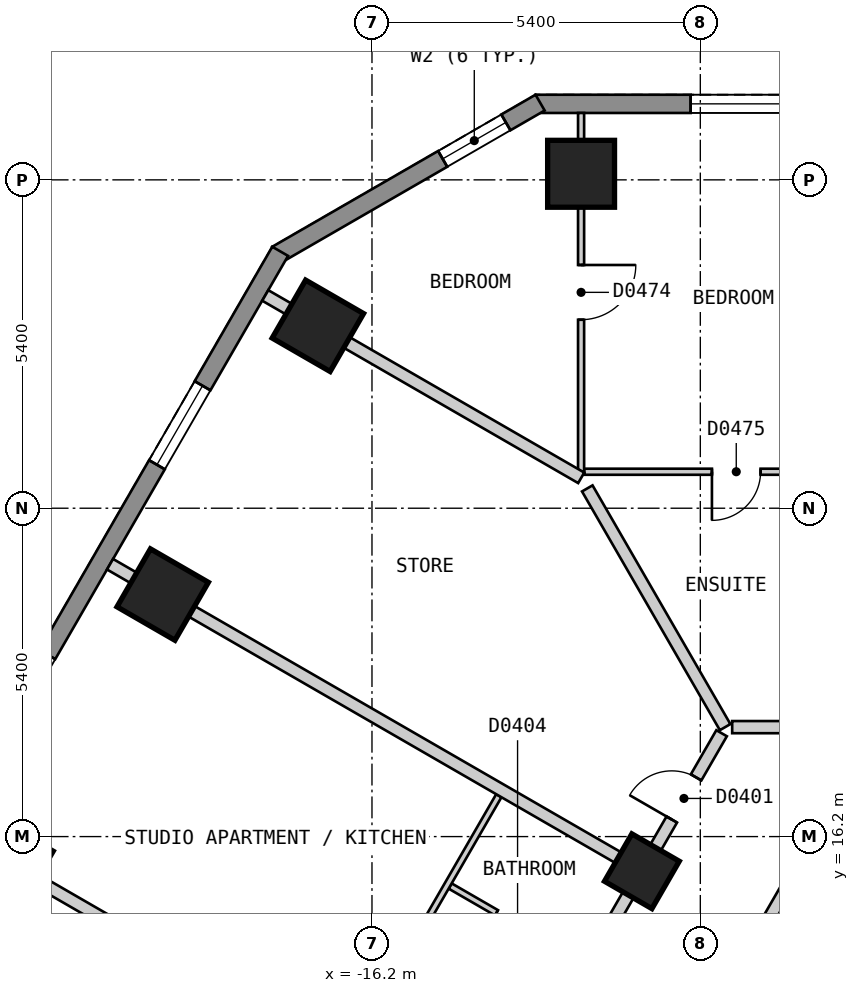
"""IFC4 building model, lengths in metres.
Left out: names, types, materials, properties, quantities, classifications, styles, units other than length and angle.
Written with IfcOpenShell. Run it as: python <this file> out.ifc"""

import sys

from ifc_helpers import new_model, si_unit, direction, frame, frame_2d, origin, origin_2d, place, context, subcontext, project, spatial, polyline, rectangle, outline, extrude, element, fill, save


model = new_model("IFC4")
c1 = context("Model", 3, precision=1e-05, world=origin(), true_north=direction((0.0, 1.0)))
c2 = subcontext(c1, "Body", "Model", "MODEL_VIEW")
j1 = project(units=[si_unit("LENGTHUNIT", "METRE"), si_unit("PLANEANGLEUNIT", "RADIAN")], contexts=[c1])
p1 = place(None, origin())
s1 = spatial("IfcSite", under=j1, at=p1, CompositionType="ELEMENT")
p2 = place(p1, origin())
s2 = spatial("IfcBuilding", under=s1, at=p2, CompositionType="ELEMENT")
p3 = place(p2, frame((0.0, 0.0, 32.4)))
s3 = spatial("IfcBuildingStorey", under=s2, at=p3, CompositionType="ELEMENT", Elevation=32.4)
for number, where, z_axis, x_axis in (
    (1, (-12.761, 27.1, 0.0), (0.0, 0.0, 1.0), (-1.0, 0.0, 0.0)),
    (2, (-17.09, 24.6, 0.0), (0.0, 0.0, 1.0), (-0.5, -0.866, 0.0)),
    (3, (-19.642, 20.18, 0.0), (0.0, 0.0, 1.0), (-0.5, -0.866, 0.0)),
    (4, (-22.194, 15.759, 0.0), (0.0, 0.0, 1.0), (-0.5, -0.866, 0.0)),
):
    element("IfcColumn", number, at=place(p3, frame(where, z_axis=z_axis, x_axis=x_axis)), inside=s3, PredefinedType="COLUMN", context=c2, shape_type="SweptSolid", body=[
        extrude(rectangle(XDim=1.1, YDim=1.1, at=origin_2d()), origin(), (0.0, 0.0, 1.0), 3.0),
    ])
p4 = place(p3, frame((-11.761, 15.63, 0.0), z_axis=(0.0, 0.0, 1.0), x_axis=(-0.499984884929, -0.866034130299, 0.0)))
e5 = element("IfcColumn", 5, at=p4, inside=s3, PredefinedType="COLUMN", context=c2, shape_type="SweptSolid", body=[
    extrude(rectangle(XDim=0.9, YDim=0.9, at=origin_2d()), origin(), (0.0, 0.0, 1.0), 3.0),
])
p5 = place(p3, frame((13.51, 28.25, 0.0), z_axis=(0.0, 0.0, 1.0), x_axis=(-1.0, 0.0, 0.0)))
e6 = element("IfcWall", 6, at=p5, inside=s3, PredefinedType="SOLIDWALL", context=c2, shape_type="SweptSolid", body=[
    extrude(outline(polyline([(0.0, -0.15), (27.02, -0.15), (26.94, 0.15), (0.08, 0.15), (0.0, -0.15)])), origin(), (0.0, 0.0, 1.0), 2.7),
])
p6 = place(p5, frame((2.553, 0.0, 0.15)))
e7 = element("IfcOpeningElement", 7, at=p6, cuts=e6, PredefinedType="OPENING", context=c2, shape_type="SweptSolid", body=[
    extrude(rectangle(XDim=1.5, YDim=2.1, at=frame_2d((0.75, 1.05))), frame((0.0, 0.16, 0.0), z_axis=(0.0, -1.0, 0.0), x_axis=(1.0, 0.0, 0.0)), (0.0, 0.0, 1.0), 0.32),
])
p7 = place(p5, frame((7.657, 0.0, 0.15)))
e8 = element("IfcOpeningElement", 8, at=p7, cuts=e6, PredefinedType="OPENING", context=c2, shape_type="SweptSolid", body=[
    extrude(rectangle(XDim=1.5, YDim=2.1, at=frame_2d((0.75, 1.05))), frame((0.0, 0.16, 0.0), z_axis=(0.0, -1.0, 0.0), x_axis=(1.0, 0.0, 0.0)), (0.0, 0.0, 1.0), 0.32),
])
p8 = place(p5, frame((12.761, 0.0, 0.15)))
e9 = element("IfcOpeningElement", 9, at=p8, cuts=e6, PredefinedType="OPENING", context=c2, shape_type="SweptSolid", body=[
    extrude(rectangle(XDim=1.5, YDim=2.1, at=frame_2d((0.75, 1.05))), frame((0.0, 0.16, 0.0), z_axis=(0.0, -1.0, 0.0), x_axis=(1.0, 0.0, 0.0)), (0.0, 0.0, 1.0), 0.32),
])
p9 = place(p5, frame((17.865, 0.0, 0.15)))
e10 = element("IfcOpeningElement", 10, at=p9, cuts=e6, PredefinedType="OPENING", context=c2, shape_type="SweptSolid", body=[
    extrude(rectangle(XDim=1.5, YDim=2.1, at=frame_2d((0.75, 1.05))), frame((0.0, 0.16, 0.0), z_axis=(0.0, -1.0, 0.0), x_axis=(1.0, 0.0, 0.0)), (0.0, 0.0, 1.0), 0.32),
])
p10 = place(p5, frame((22.969, 0.0, 0.15)))
e11 = element("IfcOpeningElement", 11, at=p10, cuts=e6, PredefinedType="OPENING", context=c2, shape_type="SweptSolid", body=[
    extrude(rectangle(XDim=1.5, YDim=2.1, at=frame_2d((0.75, 1.05))), frame((0.0, 0.16, 0.0), z_axis=(0.0, -1.0, 0.0), x_axis=(1.0, 0.0, 0.0)), (0.0, 0.0, 1.0), 0.32),
])
p11 = place(p3, frame((-13.435, 28.27, 0.0), z_axis=(0.0, 0.0, 1.0), x_axis=(-0.866010750942, -0.50002537861, 0.0)))
e12 = element("IfcWall", 12, at=p11, inside=s3, PredefinedType="SOLIDWALL", context=c2, shape_type="SweptSolid", body=[
    extrude(outline(polyline([(0.0, -0.15), (5.0, -0.15), (4.919, 0.15), (0.08, 0.15), (0.0, -0.15)])), origin(), (0.0, 0.0, 1.0), 2.7),
])
p12 = place(p11, frame((0.65, 0.0, 0.15)))
e13 = element("IfcOpeningElement", 13, at=p12, cuts=e12, PredefinedType="OPENING", context=c2, shape_type="SweptSolid", body=[
    extrude(rectangle(XDim=1.2, YDim=2.1, at=frame_2d((0.6, 1.05))), frame((0.0, 0.16, 0.0), z_axis=(0.0, -1.0, 0.0), x_axis=(1.0, 0.0, 0.0)), (0.0, 0.0, 1.0), 0.32),
])
p13 = place(p3, frame((-17.71, 25.825, 0.0), z_axis=(0.0, 0.0, 1.0), x_axis=(-0.500001938803, -0.866024284413, 0.0)))
e14 = element("IfcWall", 14, at=p13, inside=s3, PredefinedType="SOLIDWALL", context=c2, shape_type="SweptSolid", body=[
    extrude(outline(polyline([(0.0, -0.15), (27.02, -0.15), (26.94, 0.15), (0.08, 0.15), (0.0, -0.15)])), origin(), (0.0, 0.0, 1.0), 2.7),
])
p14 = place(p13, frame((2.553, 0.0, 0.15)))
e15 = element("IfcOpeningElement", 15, at=p14, cuts=e14, PredefinedType="OPENING", context=c2, shape_type="SweptSolid", body=[
    extrude(rectangle(XDim=1.5, YDim=2.1, at=frame_2d((0.75, 1.05))), frame((0.0, 0.16, 0.0), z_axis=(0.0, -1.0, 0.0), x_axis=(1.0, 0.0, 0.0)), (0.0, 0.0, 1.0), 0.32),
])
p15 = place(p13, frame((7.658, 0.0, 0.15)))
e16 = element("IfcOpeningElement", 16, at=p15, cuts=e14, PredefinedType="OPENING", context=c2, shape_type="SweptSolid", body=[
    extrude(rectangle(XDim=1.5, YDim=2.1, at=frame_2d((0.75, 1.05))), frame((0.0, 0.16, 0.0), z_axis=(0.0, -1.0, 0.0), x_axis=(1.0, 0.0, 0.0)), (0.0, 0.0, 1.0), 0.32),
])
p16 = place(p13, frame((12.761, 0.0, 0.15)))
e17 = element("IfcOpeningElement", 17, at=p16, cuts=e14, PredefinedType="OPENING", context=c2, shape_type="SweptSolid", body=[
    extrude(rectangle(XDim=1.5, YDim=2.1, at=frame_2d((0.75, 1.05))), frame((0.0, 0.16, 0.0), z_axis=(0.0, -1.0, 0.0), x_axis=(1.0, 0.0, 0.0)), (0.0, 0.0, 1.0), 0.32),
])
p17 = place(p13, frame((17.865, 0.0, 0.15)))
e18 = element("IfcOpeningElement", 18, at=p17, cuts=e14, PredefinedType="OPENING", context=c2, shape_type="SweptSolid", body=[
    extrude(rectangle(XDim=1.5, YDim=2.1, at=frame_2d((0.75, 1.05))), frame((0.0, 0.16, 0.0), z_axis=(0.0, -1.0, 0.0), x_axis=(1.0, 0.0, 0.0)), (0.0, 0.0, 1.0), 0.32),
])
p18 = place(p13, frame((22.969, 0.0, 0.15)))
e19 = element("IfcOpeningElement", 19, at=p18, cuts=e14, PredefinedType="OPENING", context=c2, shape_type="SweptSolid", body=[
    extrude(rectangle(XDim=1.5, YDim=2.1, at=frame_2d((0.75, 1.05))), frame((0.0, 0.16, 0.0), z_axis=(0.0, -1.0, 0.0), x_axis=(1.0, 0.0, 0.0)), (0.0, 0.0, 1.0), 0.32),
])
p19 = place(p3, frame((-10.276, 18.0, 0.0), z_axis=(0.0, 0.0, 1.0), x_axis=(1.0, 0.0, 0.0)))
e20 = element("IfcWall", 20, at=p19, inside=s3, PredefinedType="PARTITIONING", context=c2, shape_type="SweptSolid", body=[
    extrude(rectangle(XDim=20.5, YDim=0.2, at=frame_2d((10.25, 0.0))), origin(), (0.0, 0.0, 1.0), 2.7),
])
p20 = place(p19, frame((19.265, 0.0, 0.0)))
e21 = element("IfcOpeningElement", 21, at=p20, cuts=e20, PredefinedType="OPENING", context=c2, shape_type="SweptSolid", body=[
    extrude(rectangle(XDim=1.0, YDim=2.1, at=frame_2d((0.5, 1.05))), frame((0.0, 0.11, 0.0), z_axis=(0.0, -1.0, 0.0), x_axis=(1.0, 0.0, 0.0)), (0.0, 0.0, 1.0), 0.22),
])
p21 = place(p19, frame((9.775, 0.0, 0.0)))
e22 = element("IfcOpeningElement", 22, at=p21, cuts=e20, PredefinedType="OPENING", context=c2, shape_type="SweptSolid", body=[
    extrude(rectangle(XDim=1.0, YDim=2.1, at=frame_2d((0.5, 1.05))), frame((0.0, 0.11, 0.0), z_axis=(0.0, -1.0, 0.0), x_axis=(1.0, 0.0, 0.0)), (0.0, 0.0, 1.0), 0.22),
])
p22 = place(p19, frame((4.671, 0.0, 0.0)))
e23 = element("IfcOpeningElement", 23, at=p22, cuts=e20, PredefinedType="OPENING", context=c2, shape_type="SweptSolid", body=[
    extrude(rectangle(XDim=1.0, YDim=2.1, at=frame_2d((0.5, 1.05))), frame((0.0, 0.11, 0.0), z_axis=(0.0, -1.0, 0.0), x_axis=(1.0, 0.0, 0.0)), (0.0, 0.0, 1.0), 0.22),
])
p23 = place(p3, frame((-10.854, 8.0, 0.0), z_axis=(0.0, 0.0, 1.0), x_axis=(0.499964141897, 0.86604610548, 0.0)))
e24 = element("IfcWall", 24, at=p23, inside=s3, PredefinedType="PARTITIONING", context=c2, shape_type="SweptSolid", body=[
    extrude(rectangle(XDim=9.007, YDim=0.2, at=frame_2d((4.503, 0.0))), origin(), (0.0, 0.0, 1.0), 2.7),
])
p24 = place(p3, frame((-18.244, -0.001, 0.0), z_axis=(0.0, 0.0, 1.0), x_axis=(0.499962999376, 0.866046765051, 0.0)))
e25 = element("IfcWall", 25, at=p24, inside=s3, PredefinedType="PARTITIONING", context=c2, shape_type="SweptSolid", body=[
    extrude(rectangle(XDim=18.245, YDim=0.2, at=frame_2d((9.123, 0.0))), origin(), (0.0, 0.0, 1.0), 2.7),
])
p25 = place(p24, frame((8.672, 0.0, 0.0)))
e26 = element("IfcOpeningElement", 26, at=p25, cuts=e25, PredefinedType="OPENING", context=c2, shape_type="SweptSolid", body=[
    extrude(rectangle(XDim=0.9, YDim=2.1, at=frame_2d((0.45, 1.05))), frame((0.0, 0.11, 0.0), z_axis=(0.0, -1.0, 0.0), x_axis=(1.0, 0.0, 0.0)), (0.0, 0.0, 1.0), 0.22),
])
p26 = place(p3, frame((-20.727, 0.099, 0.0), z_axis=(0.0, 0.0, 1.0), x_axis=(0.499993204491, 0.866029327138, 0.0)))
e27 = element("IfcWall", 27, at=p26, inside=s3, PredefinedType="PARTITIONING", context=c2, shape_type="SweptSolid", body=[
    extrude(rectangle(XDim=20.554, YDim=0.2, at=frame_2d((10.277, 0.0))), origin(), (0.0, 0.0, 1.0), 2.7),
])
p27 = place(p26, frame((18.916, 0.0, 0.0)))
e28 = element("IfcOpeningElement", 28, at=p27, cuts=e27, PredefinedType="OPENING", context=c2, shape_type="SweptSolid", body=[
    extrude(rectangle(XDim=0.8, YDim=2.1, at=frame_2d((0.4, 1.05))), frame((0.0, 0.11, 0.0), z_axis=(0.0, -1.0, 0.0), x_axis=(1.0, 0.0, 0.0)), (0.0, 0.0, 1.0), 0.22),
])
p28 = place(p26, frame((14.88, 0.0, 0.0)))
e29 = element("IfcOpeningElement", 29, at=p28, cuts=e27, PredefinedType="OPENING", context=c2, shape_type="SweptSolid", body=[
    extrude(rectangle(XDim=1.0, YDim=2.1, at=frame_2d((0.5, 1.05))), frame((0.0, 0.11, 0.0), z_axis=(0.0, -1.0, 0.0), x_axis=(1.0, 0.0, 0.0)), (0.0, 0.0, 1.0), 0.22),
])
p29 = place(p26, frame((9.776, 0.0, 0.0)))
e30 = element("IfcOpeningElement", 30, at=p29, cuts=e27, PredefinedType="OPENING", context=c2, shape_type="SweptSolid", body=[
    extrude(rectangle(XDim=1.0, YDim=2.1, at=frame_2d((0.5, 1.05))), frame((0.0, 0.11, 0.0), z_axis=(0.0, -1.0, 0.0), x_axis=(1.0, 0.0, 0.0)), (0.0, 0.0, 1.0), 0.22),
])
p30 = place(p26, frame((4.673, 0.0, 0.0)))
e31 = element("IfcOpeningElement", 31, at=p30, cuts=e27, PredefinedType="OPENING", context=c2, shape_type="SweptSolid", body=[
    extrude(rectangle(XDim=1.0, YDim=2.1, at=frame_2d((0.5, 1.05))), frame((0.0, 0.11, 0.0), z_axis=(0.0, -1.0, 0.0), x_axis=(1.0, 0.0, 0.0)), (0.0, 0.0, 1.0), 0.22),
])
p31 = place(p26, frame((0.838, 0.0, 0.0)))
e32 = element("IfcOpeningElement", 32, at=p31, cuts=e27, PredefinedType="OPENING", context=c2, shape_type="SweptSolid", body=[
    extrude(rectangle(XDim=0.8, YDim=2.1, at=frame_2d((0.4, 1.05))), frame((0.0, 0.11, 0.0), z_axis=(0.0, -1.0, 0.0), x_axis=(1.0, 0.0, 0.0)), (0.0, 0.0, 1.0), 0.22),
])
p32 = place(p3, frame((-14.914, 15.387, 0.0), z_axis=(0.0, 0.0, 1.0), x_axis=(0.865983051302, -0.500073349477, 0.0)))
e33 = element("IfcWall", 33, at=p32, inside=s3, PredefinedType="PARTITIONING", context=c2, shape_type="SweptSolid", body=[
    extrude(rectangle(XDim=2.509, YDim=0.1, at=frame_2d((1.255, 0.0))), origin(), (0.0, 0.0, 1.0), 2.7),
])
p33 = place(p32, frame((0.88, 0.0, 0.0)))
e34 = element("IfcOpeningElement", 34, at=p33, cuts=e33, PredefinedType="OPENING", context=c2, shape_type="SweptSolid", body=[
    extrude(rectangle(XDim=0.8, YDim=2.1, at=frame_2d((0.4, 1.05))), frame((0.0, 0.06, 0.0), z_axis=(0.0, -1.0, 0.0), x_axis=(1.0, 0.0, 0.0)), (0.0, 0.0, 1.0), 0.12),
])
p34 = place(p3, frame((-12.711, 22.2, 0.0), z_axis=(0.0, 0.0, 1.0), x_axis=(1.0, 0.0, 0.0)))
e35 = element("IfcWall", 35, at=p34, inside=s3, PredefinedType="PARTITIONING", context=c2, shape_type="SweptSolid", body=[
    extrude(rectangle(XDim=10.058, YDim=0.1, at=frame_2d((5.029, 0.0))), origin(), (0.0, 0.0, 1.0), 2.7),
])
p35 = place(p34, frame((7.156, 0.0, 0.0)))
e36 = element("IfcOpeningElement", 36, at=p35, cuts=e35, PredefinedType="OPENING", context=c2, shape_type="SweptSolid", body=[
    extrude(rectangle(XDim=0.9, YDim=2.1, at=frame_2d((0.45, 1.05))), frame((0.0, 0.06, 0.0), z_axis=(0.0, -1.0, 0.0), x_axis=(1.0, 0.0, 0.0)), (0.0, 0.0, 1.0), 0.12),
])
p36 = place(p34, frame((2.102, 0.0, 0.0)))
e37 = element("IfcOpeningElement", 37, at=p36, cuts=e35, PredefinedType="OPENING", context=c2, shape_type="SweptSolid", body=[
    extrude(rectangle(XDim=0.8, YDim=2.1, at=frame_2d((0.4, 1.05))), frame((0.0, 0.06, 0.0), z_axis=(0.0, -1.0, 0.0), x_axis=(1.0, 0.0, 0.0)), (0.0, 0.0, 1.0), 0.12),
])
p37 = place(p3, frame((-15.723, 14.087, 0.0), z_axis=(0.0, 0.0, 1.0), x_axis=(0.500204249835, 0.865907447969, 0.0)))
e38 = element("IfcWall", 38, at=p37, inside=s3, PredefinedType="PARTITIONING", context=c2, shape_type="SweptSolid", body=[
    extrude(rectangle(XDim=3.217, YDim=0.1, at=frame_2d((1.608, 0.0))), origin(), (0.0, 0.0, 1.0), 2.7),
])
p38 = place(p3, frame((-12.761, 22.2, 0.0), z_axis=(0.0, 0.0, 1.0), x_axis=(0.0, 1.0, 0.0)))
e39 = element("IfcWall", 39, at=p38, inside=s3, PredefinedType="PARTITIONING", context=c2, shape_type="SweptSolid", body=[
    extrude(rectangle(XDim=5.9, YDim=0.1, at=frame_2d((2.95, 0.0))), origin(), (0.0, 0.0, 1.0), 2.7),
])
p39 = place(p38, frame((2.5, 0.0, 0.0)))
e40 = element("IfcOpeningElement", 40, at=p39, cuts=e39, PredefinedType="OPENING", context=c2, shape_type="SweptSolid", body=[
    extrude(rectangle(XDim=0.9, YDim=2.1, at=frame_2d((0.45, 1.05))), frame((0.0, 0.06, 0.0), z_axis=(0.0, -1.0, 0.0), x_axis=(1.0, 0.0, 0.0)), (0.0, 0.0, 1.0), 0.12),
])
p40 = place(p3, frame((-12.659, 21.926, 0.0), z_axis=(0.0, 0.0, 1.0), x_axis=(0.500025458316, -0.86601070492, 0.0)))
e41 = element("IfcWall", 41, at=p40, inside=s3, PredefinedType="PARTITIONING", context=c2, shape_type="SweptSolid", body=[
    extrude(rectangle(XDim=4.533, YDim=0.2, at=frame_2d((2.267, 0.0))), origin(), (0.0, 0.0, 1.0), 2.7),
])
p41 = place(p3, frame((-20.508, 20.679, 0.0), z_axis=(0.0, 0.0, 1.0), x_axis=(0.866047370643, -0.499961950354, 0.0)))
e42 = element("IfcWall", 42, at=p41, inside=s3, PredefinedType="PARTITIONING", context=c2, shape_type="SweptSolid", body=[
    extrude(rectangle(XDim=10.001, YDim=0.2, at=frame_2d((5.0, 0.0))), origin(), (0.0, 0.0, 1.0), 2.7),
])
p42 = place(p3, frame((-17.955, 25.099, 0.0), z_axis=(0.0, 0.0, 1.0), x_axis=(0.86609140076, -0.499885672459, 0.0)))
e43 = element("IfcWall", 43, at=p42, inside=s3, PredefinedType="PARTITIONING", context=c2, shape_type="SweptSolid", body=[
    extrude(rectangle(XDim=6.0, YDim=0.2, at=frame_2d((3.0, 0.0))), origin(), (0.0, 0.0, 1.0), 2.7),
])
p43 = place(p3, frame((-23.06, 16.259, 0.0), z_axis=(0.0, 0.0, 1.0), x_axis=(0.866047370643, -0.499961950354, 0.0)))
e44 = element("IfcWall", 44, at=p43, inside=s3, PredefinedType="PARTITIONING", context=c2, shape_type="SweptSolid", body=[
    extrude(rectangle(XDim=10.001, YDim=0.2, at=frame_2d((5.0, 0.0))), origin(), (0.0, 0.0, 1.0), 2.7),
])
p44 = place(p10, origin())
e45 = element("IfcWindow", 45, at=p44, inside=s3, PartitioningType="SINGLE_PANEL", PredefinedType="WINDOW", context=c2, shape_type="SweptSolid", body=[
    extrude(rectangle(XDim=1.5, YDim=2.1, at=frame_2d((0.75, 1.05))), frame((0.0, 0.03, 0.0), z_axis=(0.0, -1.0, 0.0), x_axis=(1.0, 0.0, 0.0)), (0.0, 0.0, 1.0), 0.06),
])
fill(e11, e45)
p45 = place(p12, origin())
e46 = element("IfcWindow", 46, at=p45, inside=s3, PartitioningType="SINGLE_PANEL", PredefinedType="WINDOW", context=c2, shape_type="SweptSolid", body=[
    extrude(rectangle(XDim=1.2, YDim=2.1, at=frame_2d((0.6, 1.05))), frame((0.0, 0.03, 0.0), z_axis=(0.0, -1.0, 0.0), x_axis=(1.0, 0.0, 0.0)), (0.0, 0.0, 1.0), 0.06),
])
fill(e13, e46)
p46 = place(p14, origin())
e47 = element("IfcWindow", 47, at=p46, inside=s3, PartitioningType="SINGLE_PANEL", PredefinedType="WINDOW", context=c2, shape_type="SweptSolid", body=[
    extrude(rectangle(XDim=1.5, YDim=2.1, at=frame_2d((0.75, 1.05))), frame((0.0, 0.03, 0.0), z_axis=(0.0, -1.0, 0.0), x_axis=(1.0, 0.0, 0.0)), (0.0, 0.0, 1.0), 0.06),
])
fill(e15, e47)
p47 = place(p27, origin())
e48 = element("IfcDoor", 48, at=p47, inside=s3, OperationType="SINGLE_SWING_LEFT", PredefinedType="DOOR", context=c2, shape_type="SweptSolid", body=[
    extrude(rectangle(XDim=0.8, YDim=2.1, at=frame_2d((0.4, 1.05))), frame((0.0, 0.025, 0.0), z_axis=(0.0, -1.0, 0.0), x_axis=(1.0, 0.0, 0.0)), (0.0, 0.0, 1.0), 0.05),
])
fill(e28, e48)
p48 = place(p33, origin())
e49 = element("IfcDoor", 49, at=p48, inside=s3, OperationType="SINGLE_SWING_RIGHT", PredefinedType="DOOR", context=c2, shape_type="SweptSolid", body=[
    extrude(rectangle(XDim=0.8, YDim=2.1, at=frame_2d((0.4, 1.05))), frame((0.0, 0.025, 0.0), z_axis=(0.0, -1.0, 0.0), x_axis=(1.0, 0.0, 0.0)), (0.0, 0.0, 1.0), 0.05),
])
fill(e34, e49)
p49 = place(p39, origin())
e50 = element("IfcDoor", 50, at=p49, inside=s3, OperationType="SINGLE_SWING_RIGHT", PredefinedType="DOOR", context=c2, shape_type="SweptSolid", body=[
    extrude(rectangle(XDim=0.9, YDim=2.1, at=frame_2d((0.45, 1.05))), frame((0.0, 0.025, 0.0), z_axis=(0.0, -1.0, 0.0), x_axis=(1.0, 0.0, 0.0)), (0.0, 0.0, 1.0), 0.05),
])
fill(e40, e50)
p50 = place(p36, origin())
e51 = element("IfcDoor", 51, at=p50, inside=s3, OperationType="SINGLE_SWING_LEFT", PredefinedType="DOOR", context=c2, shape_type="SweptSolid", body=[
    extrude(rectangle(XDim=0.8, YDim=2.1, at=frame_2d((0.4, 1.05))), frame((0.0, 0.025, 0.0), z_axis=(0.0, -1.0, 0.0), x_axis=(1.0, 0.0, 0.0)), (0.0, 0.0, 1.0), 0.05),
])
fill(e37, e51)
save(model, sys.argv[1])
